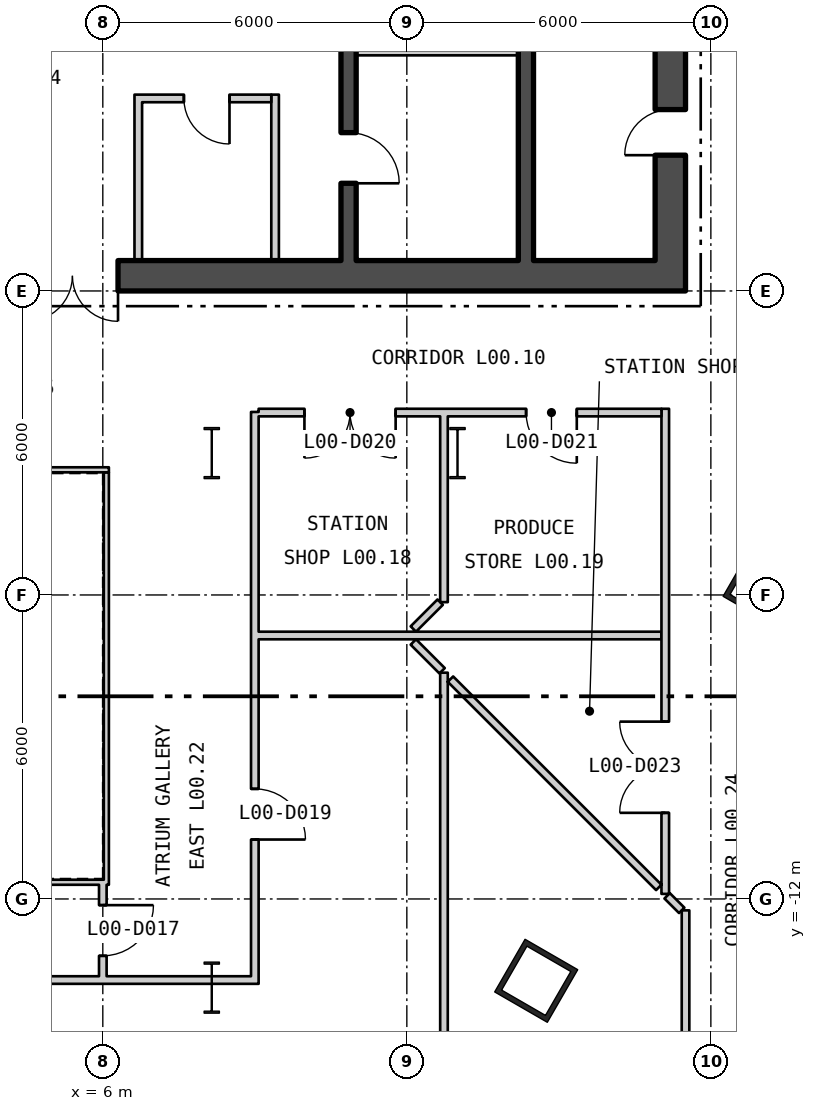
"""IFC4 building model, lengths in metres.
Left out: names, types, materials, properties, quantities, classifications, styles, units other than length and angle.
Written with IfcOpenShell. Run it as: python <this file> out.ifc"""

import sys

from ifc_helpers import new_model, si_unit, direction, frame, frame_2d, origin, origin_2d, place, context, subcontext, project, spatial, rectangle, hollow_rectangle, i_section, extrude, element, fill, save


model = new_model("IFC4")
c1 = context("Model", 3, precision=1e-05, world=origin(), true_north=direction((0.0, 1.0)))
c2 = subcontext(c1, "Body", "Model", "MODEL_VIEW")
j1 = project(units=[si_unit("LENGTHUNIT", "METRE"), si_unit("PLANEANGLEUNIT", "RADIAN")], contexts=[c1])
p1 = place(None, origin())
s1 = spatial("IfcSite", under=j1, at=p1, CompositionType="ELEMENT")
p2 = place(p1, origin())
s2 = spatial("IfcBuilding", under=s1, at=p2, CompositionType="ELEMENT")
p3 = place(p2, origin())
s3 = spatial("IfcBuildingStorey", under=s2, at=p3, CompositionType="ELEMENT", Elevation=0.0)
for number, where, z_axis, x_axis in (
    (1, (14.553, -13.615, 0.0), (0.0, 0.0, 1.0), (0.5, 0.866, 0.0)),
    (2, (19.061, -5.807, 0.0), (0.0, 0.0, 1.0), (0.5, 0.866, 0.0)),
):
    element("IfcColumn", number, at=place(p3, frame(where, z_axis=z_axis, x_axis=x_axis)), inside=s3, PredefinedType="COLUMN", context=c2, shape_type="SweptSolid", body=[
        extrude(hollow_rectangle(XDim=1.2, YDim=1.2, WallThickness=0.1, at=origin_2d()), origin(), (0.0, 0.0, 1.0), 8.4),
    ])
for number, where, z_axis, x_axis in (
    (3, (8.15, -3.2, 0.0), (0.0, 0.0, 1.0), (1.0, 0.0, 0.0)),
    (4, (8.15, -13.75, 0.0), (0.0, 0.0, 1.0), (1.0, 0.0, 0.0)),
    (5, (13.0, -3.2, 0.0), (0.0, 0.0, 1.0), (1.0, 0.0, 0.0)),
):
    element("IfcColumn", number, at=place(p3, frame(where, z_axis=z_axis, x_axis=x_axis)), inside=s3, PredefinedType="COLUMN", context=c2, shape_type="SweptSolid", body=[
        extrude(i_section(OverallWidth=0.302, OverallDepth=1.008, WebThickness=0.021, FlangeThickness=0.04, at=origin_2d()), origin(), (0.0, 0.0, 1.0), 8.4),
    ])
p4 = place(p3, frame((-6.12, -11.67, 0.0), z_axis=(0.0, 0.0, 1.0), x_axis=(1.0, 0.0, 0.0)))
e6 = element("IfcWall", 6, at=p4, inside=s3, PredefinedType="PARTITIONING", context=c2, shape_type="SweptSolid", body=[
    extrude(rectangle(XDim=12.24, YDim=0.1, at=frame_2d((6.12, 0.0))), origin(), (0.0, 0.0, 1.0), 8.18),
])
p5 = place(p3, frame((6.07, -11.62, 0.0), z_axis=(0.0, 0.0, 1.0), x_axis=(0.0, 1.0, 0.0)))
e7 = element("IfcWall", 7, at=p5, inside=s3, PredefinedType="PARTITIONING", context=c2, shape_type="SweptSolid", body=[
    extrude(rectangle(XDim=8.04, YDim=0.1, at=frame_2d((4.02, 0.0))), origin(), (0.0, 0.0, 1.0), 8.18),
])
p6 = place(p3, frame((6.12, -3.53, 0.0), z_axis=(0.0, 0.0, 1.0), x_axis=(-1.0, 0.0, 0.0)))
e8 = element("IfcWall", 8, at=p6, inside=s3, PredefinedType="PARTITIONING", context=c2, shape_type="SweptSolid", body=[
    extrude(rectangle(XDim=12.24, YDim=0.1, at=frame_2d((6.12, 0.0))), origin(), (0.0, 0.0, 1.0), 8.18),
])
p7 = place(p3, frame((-17.5, 0.3, 0.0), z_axis=(0.0, 0.0, 1.0), x_axis=(1.0, 0.0, 0.0)))
e9 = element("IfcWall", 9, at=p7, inside=s3, PredefinedType="SHEAR", context=c2, shape_type="SweptSolid", body=[
    extrude(rectangle(XDim=35.0, YDim=0.6, at=frame_2d((17.5, 0.0))), origin(), (0.0, 0.0, 1.0), 8.18),
])
p8 = place(p7, frame((12.0, 0.0, 0.0)))
e10 = element("IfcOpeningElement", 10, at=p8, cuts=e9, PredefinedType="OPENING", context=c2, shape_type="SweptSolid", body=[
    extrude(rectangle(XDim=1.8, YDim=2.4, at=frame_2d((0.9, 1.2))), frame((0.0, 0.31, 0.0), z_axis=(0.0, -1.0, 0.0), x_axis=(1.0, 0.0, 0.0)), (0.0, 0.0, 1.0), 0.62),
])
p9 = place(p7, frame((22.0, 0.0, 0.0)))
e11 = element("IfcOpeningElement", 11, at=p9, cuts=e9, PredefinedType="OPENING", context=c2, shape_type="SweptSolid", body=[
    extrude(rectangle(XDim=1.8, YDim=2.4, at=frame_2d((0.9, 1.2))), frame((0.0, 0.31, 0.0), z_axis=(0.0, -1.0, 0.0), x_axis=(1.0, 0.0, 0.0)), (0.0, 0.0, 1.0), 0.62),
])
p10 = place(p3, frame((17.2, 0.6, 0.0), z_axis=(0.0, 0.0, 1.0), x_axis=(0.0, 1.0, 0.0)))
e12 = element("IfcWall", 12, at=p10, inside=s3, PredefinedType="SHEAR", context=c2, shape_type="SweptSolid", body=[
    extrude(rectangle(XDim=16.8, YDim=0.6, at=frame_2d((8.4, 0.0))), origin(), (0.0, 0.0, 1.0), 8.18),
])
p11 = place(p10, frame((7.1, 0.0, 0.0)))
e13 = element("IfcOpeningElement", 13, at=p11, cuts=e12, PredefinedType="OPENING", context=c2, shape_type="SweptSolid", body=[
    extrude(rectangle(XDim=1.5, YDim=2.4, at=frame_2d((0.75, 1.2))), frame((0.0, 0.31, 0.0), z_axis=(0.0, -1.0, 0.0), x_axis=(1.0, 0.0, 0.0)), (0.0, 0.0, 1.0), 0.62),
])
p12 = place(p10, frame((9.525, 0.0, 0.0)))
e14 = element("IfcOpeningElement", 14, at=p12, cuts=e12, PredefinedType="OPENING", context=c2, shape_type="SweptSolid", body=[
    extrude(rectangle(XDim=1.5, YDim=2.4, at=frame_2d((0.75, 1.2))), frame((0.0, 0.31, 0.0), z_axis=(0.0, -1.0, 0.0), x_axis=(1.0, 0.0, 0.0)), (0.0, 0.0, 1.0), 0.62),
])
p13 = place(p10, frame((2.08, 0.0, 0.0)))
e15 = element("IfcOpeningElement", 15, at=p13, cuts=e12, PredefinedType="OPENING", context=c2, shape_type="SweptSolid", body=[
    extrude(rectangle(XDim=0.9, YDim=2.1, at=frame_2d((0.45, 1.05))), frame((0.0, 0.31, 0.0), z_axis=(0.0, -1.0, 0.0), x_axis=(1.0, 0.0, 0.0)), (0.0, 0.0, 1.0), 0.62),
])
p14 = place(p10, frame((5.63, 0.0, 0.0)))
e16 = element("IfcOpeningElement", 16, at=p14, cuts=e12, PredefinedType="OPENING", context=c2, shape_type="SweptSolid", body=[
    extrude(rectangle(XDim=0.9, YDim=2.1, at=frame_2d((0.45, 1.05))), frame((0.0, 0.31, 0.0), z_axis=(0.0, -1.0, 0.0), x_axis=(1.0, 0.0, 0.0)), (0.0, 0.0, 1.0), 0.62),
])
p15 = place(p10, frame((13.175, 0.0, 0.0)))
e17 = element("IfcOpeningElement", 17, at=p15, cuts=e12, PredefinedType="OPENING", context=c2, shape_type="SweptSolid", body=[
    extrude(rectangle(XDim=1.0, YDim=2.1, at=frame_2d((0.5, 1.05))), frame((0.0, 0.31, 0.0), z_axis=(0.0, -1.0, 0.0), x_axis=(1.0, 0.0, 0.0)), (0.0, 0.0, 1.0), 0.62),
])
p16 = place(p10, frame((15.238, 0.0, 0.0)))
e18 = element("IfcOpeningElement", 18, at=p16, cuts=e12, PredefinedType="OPENING", context=c2, shape_type="SweptSolid", body=[
    extrude(rectangle(XDim=0.9, YDim=2.1, at=frame_2d((0.45, 1.05))), frame((0.0, 0.31, 0.0), z_axis=(0.0, -1.0, 0.0), x_axis=(1.0, 0.0, 0.0)), (0.0, 0.0, 1.0), 0.62),
])
p17 = place(p3, frame((10.85, 0.6, 0.0), z_axis=(0.0, 0.0, 1.0), x_axis=(0.0, 1.0, 0.0)))
e19 = element("IfcWall", 19, at=p17, inside=s3, PredefinedType="SHEAR", context=c2, shape_type="SweptSolid", body=[
    extrude(rectangle(XDim=16.8, YDim=0.3, at=frame_2d((8.4, 0.0))), origin(), (0.0, 0.0, 1.0), 8.18),
])
p18 = place(p17, frame((1.525, 0.0, 0.0)))
e20 = element("IfcOpeningElement", 20, at=p18, cuts=e19, PredefinedType="OPENING", context=c2, shape_type="SweptSolid", body=[
    extrude(rectangle(XDim=1.0, YDim=2.1, at=frame_2d((0.5, 1.05))), frame((0.0, 0.16, 0.0), z_axis=(0.0, -1.0, 0.0), x_axis=(1.0, 0.0, 0.0)), (0.0, 0.0, 1.0), 0.32),
])
p19 = place(p3, frame((14.35, 0.6, 0.0), z_axis=(0.0, 0.0, 1.0), x_axis=(0.0, 1.0, 0.0)))
e21 = element("IfcWall", 21, at=p19, inside=s3, PredefinedType="SHEAR", context=c2, shape_type="SweptSolid", body=[
    extrude(rectangle(XDim=16.8, YDim=0.3, at=frame_2d((8.4, 0.0))), origin(), (0.0, 0.0, 1.0), 8.18),
])
p20 = place(p19, frame((9.25, 0.0, 0.0)))
e22 = element("IfcOpeningElement", 22, at=p20, cuts=e21, PredefinedType="OPENING", context=c2, shape_type="SweptSolid", body=[
    extrude(rectangle(XDim=1.0, YDim=2.1, at=frame_2d((0.5, 1.05))), frame((0.0, 0.16, 0.0), z_axis=(0.0, -1.0, 0.0), x_axis=(1.0, 0.0, 0.0)), (0.0, 0.0, 1.0), 0.32),
])
p21 = place(p19, frame((7.1, 0.0, 0.0)))
e23 = element("IfcOpeningElement", 23, at=p21, cuts=e21, PredefinedType="OPENING", context=c2, shape_type="SweptSolid", body=[
    extrude(rectangle(XDim=1.5, YDim=2.4, at=frame_2d((0.75, 1.2))), frame((0.0, 0.16, 0.0), z_axis=(0.0, -1.0, 0.0), x_axis=(1.0, 0.0, 0.0)), (0.0, 0.0, 1.0), 0.32),
])
p22 = place(p3, frame((11.0, 4.725, 0.0), z_axis=(0.0, 0.0, 1.0), x_axis=(1.0, 0.0, 0.0)))
e24 = element("IfcWall", 24, at=p22, inside=s3, PredefinedType="PARTITIONING", context=c2, shape_type="SweptSolid", body=[
    extrude(rectangle(XDim=3.2, YDim=0.15, at=frame_2d((1.6, 0.0))), origin(), (0.0, 0.0, 1.0), 8.18),
])
for number, where, z_axis, x_axis in (
    (25, (6.7, 0.6, 0.0), (0.0, 0.0, 1.0), (0.0, 1.0, 0.0)),
    (26, (9.4, 0.6, 0.0), (0.0, 0.0, 1.0), (0.0, 1.0, 0.0)),
):
    element("IfcWall", number, at=place(p3, frame(where, z_axis=z_axis, x_axis=x_axis)), inside=s3, PredefinedType="PARTITIONING", context=c2, shape_type="SweptSolid", body=[
        extrude(rectangle(XDim=3.275, YDim=0.15, at=frame_2d((1.637, 0.0))), origin(), (0.0, 0.0, 1.0), 8.18),
    ])
p23 = place(p3, frame((6.775, 3.8, 0.0), z_axis=(0.0, 0.0, 1.0), x_axis=(1.0, 0.0, 0.0)))
e27 = element("IfcWall", 27, at=p23, inside=s3, PredefinedType="PARTITIONING", context=c2, shape_type="SweptSolid", body=[
    extrude(rectangle(XDim=2.55, YDim=0.15, at=frame_2d((1.275, 0.0))), origin(), (0.0, 0.0, 1.0), 8.18),
])
p24 = place(p23, frame((0.825, 0.0, 0.0)))
e28 = element("IfcOpeningElement", 28, at=p24, cuts=e27, PredefinedType="OPENING", context=c2, shape_type="SweptSolid", body=[
    extrude(rectangle(XDim=0.9, YDim=2.1, at=frame_2d((0.45, 1.05))), frame((0.0, 0.085, 0.0), z_axis=(0.0, -1.0, 0.0), x_axis=(1.0, 0.0, 0.0)), (0.0, 0.0, 1.0), 0.17),
])
p25 = place(p3, frame((4.3, -13.6, 0.0), z_axis=(0.0, 0.0, 1.0), x_axis=(1.0, 0.0, 0.0)))
e29 = element("IfcWall", 29, at=p25, inside=s3, PredefinedType="PARTITIONING", context=c2, shape_type="SweptSolid", body=[
    extrude(rectangle(XDim=3.85, YDim=0.15, at=frame_2d((1.925, 0.0))), origin(), (0.0, 0.0, 1.0), 7.27),
])
p26 = place(p3, frame((8.15, -13.6, 0.0), z_axis=(0.0, 0.0, 1.0), x_axis=(1.0, 0.0, 0.0)))
e30 = element("IfcWall", 30, at=p26, inside=s3, PredefinedType="PARTITIONING", context=c2, shape_type="SweptSolid", body=[
    extrude(rectangle(XDim=0.775, YDim=0.15, at=frame_2d((0.388, 0.0))), origin(), (0.0, 0.0, 1.0), 7.39),
])
p27 = place(p3, frame((6.0, -13.525, 0.0), z_axis=(0.0, 0.0, 1.0), x_axis=(0.0, 1.0, 0.0)))
e31 = element("IfcWall", 31, at=p27, inside=s3, PredefinedType="PARTITIONING", context=c2, shape_type="SweptSolid", body=[
    extrude(rectangle(XDim=1.805, YDim=0.15, at=frame_2d((0.902, 0.0))), origin(), (0.0, 0.0, 1.0), 8.18),
])
p28 = place(p27, frame((0.403, 0.0, 0.0)))
e32 = element("IfcOpeningElement", 32, at=p28, cuts=e31, PredefinedType="OPENING", context=c2, shape_type="SweptSolid", body=[
    extrude(rectangle(XDim=1.0, YDim=2.1, at=frame_2d((0.5, 1.05))), frame((0.0, 0.085, 0.0), z_axis=(0.0, -1.0, 0.0), x_axis=(1.0, 0.0, 0.0)), (0.0, 0.0, 1.0), 0.17),
])
p29 = place(p3, frame((9.0, -13.675, 0.0), z_axis=(0.0, 0.0, 1.0), x_axis=(0.0, 1.0, 0.0)))
e33 = element("IfcWall", 33, at=p29, inside=s3, PredefinedType="PARTITIONING", context=c2, shape_type="SweptSolid", body=[
    extrude(rectangle(XDim=11.287, YDim=0.15, at=frame_2d((5.644, 0.0))), origin(), (0.0, 0.0, 1.0), 8.18),
])
p30 = place(p29, frame((2.848, 0.0, 0.0)))
e34 = element("IfcOpeningElement", 34, at=p30, cuts=e33, PredefinedType="OPENING", context=c2, shape_type="SweptSolid", body=[
    extrude(rectangle(XDim=1.0, YDim=2.1, at=frame_2d((0.5, 1.05))), frame((0.0, 0.085, 0.0), z_axis=(0.0, -1.0, 0.0), x_axis=(1.0, 0.0, 0.0)), (0.0, 0.0, 1.0), 0.17),
])
p31 = place(p3, frame((9.075, -6.8, 0.0), z_axis=(0.0, 0.0, 1.0), x_axis=(1.0, 0.0, 0.0)))
e35 = element("IfcWall", 35, at=p31, inside=s3, PredefinedType="PARTITIONING", context=c2, shape_type="SweptSolid", body=[
    extrude(rectangle(XDim=7.95, YDim=0.15, at=frame_2d((3.975, 0.0))), origin(), (0.0, 0.0, 1.0), 8.18),
])
p32 = place(p3, frame((9.075, -2.4, 0.0), z_axis=(0.0, 0.0, 1.0), x_axis=(1.0, 0.0, 0.0)))
e36 = element("IfcWall", 36, at=p32, inside=s3, PredefinedType="PARTITIONING", context=c2, shape_type="SweptSolid", body=[
    extrude(rectangle(XDim=7.95, YDim=0.15, at=frame_2d((3.975, 0.0))), origin(), (0.0, 0.0, 1.0), 8.18),
])
p33 = place(p32, frame((0.904, 0.0, 0.0)))
e37 = element("IfcOpeningElement", 37, at=p33, cuts=e36, PredefinedType="OPENING", context=c2, shape_type="SweptSolid", body=[
    extrude(rectangle(XDim=1.8, YDim=2.1, at=frame_2d((0.9, 1.05))), frame((0.0, 0.085, 0.0), z_axis=(0.0, -1.0, 0.0), x_axis=(1.0, 0.0, 0.0)), (0.0, 0.0, 1.0), 0.17),
])
p34 = place(p32, frame((5.279, 0.0, 0.0)))
e38 = element("IfcOpeningElement", 38, at=p34, cuts=e36, PredefinedType="OPENING", context=c2, shape_type="SweptSolid", body=[
    extrude(rectangle(XDim=1.0, YDim=2.1, at=frame_2d((0.5, 1.05))), frame((0.0, 0.085, 0.0), z_axis=(0.0, -1.0, 0.0), x_axis=(1.0, 0.0, 0.0)), (0.0, 0.0, 1.0), 0.17),
])
p35 = place(p3, frame((12.128, -6.928, 0.0), z_axis=(0.0, 0.0, 1.0), x_axis=(0.707106781187, -0.707106781187, 0.0)))
e39 = element("IfcWall", 39, at=p35, inside=s3, PredefinedType="PARTITIONING", context=c2, shape_type="SweptSolid", body=[
    extrude(rectangle(XDim=0.803, YDim=0.15, at=frame_2d((0.402, 0.0))), origin(), (0.0, 0.0, 1.0), 8.18),
])
p36 = place(p3, frame((12.128, -6.672, 0.0), z_axis=(0.0, 0.0, 1.0), x_axis=(0.707106781187, 0.707106781187, 0.0)))
e40 = element("IfcWall", 40, at=p36, inside=s3, PredefinedType="PARTITIONING", context=c2, shape_type="SweptSolid", body=[
    extrude(rectangle(XDim=0.75, YDim=0.15, at=frame_2d((0.375, 0.0))), origin(), (0.0, 0.0, 1.0), 8.18),
])
p37 = place(p3, frame((12.733, -16.567, 0.0), z_axis=(0.0, 0.0, 1.0), x_axis=(0.0, 1.0, 0.0)))
e41 = element("IfcWall", 41, at=p37, inside=s3, PredefinedType="PARTITIONING", context=c2, shape_type="SweptSolid", body=[
    extrude(rectangle(XDim=2.717, YDim=0.15, at=frame_2d((1.359, 0.0))), origin(), (0.0, 0.0, 1.0), 7.58),
])
p38 = place(p3, frame((12.733, -13.85, 0.0), z_axis=(0.0, 0.0, 1.0), x_axis=(0.0, 1.0, 0.0)))
e42 = element("IfcWall", 42, at=p38, inside=s3, PredefinedType="PARTITIONING", context=c2, shape_type="SweptSolid", body=[
    extrude(rectangle(XDim=6.316, YDim=0.15, at=frame_2d((3.158, 0.0))), origin(), (0.0, 0.0, 1.0), 7.49),
])
p39 = place(p3, frame((12.733, -6.142, 0.0), z_axis=(0.0, 0.0, 1.0), x_axis=(0.0, 1.0, 0.0)))
e43 = element("IfcWall", 43, at=p39, inside=s3, PredefinedType="PARTITIONING", context=c2, shape_type="SweptSolid", body=[
    extrude(rectangle(XDim=3.042, YDim=0.15, at=frame_2d((1.521, 0.0))), origin(), (0.0, 0.0, 1.0), 7.49),
])
p40 = place(p3, frame((12.733, -3.1, 0.0), z_axis=(0.0, 0.0, 1.0), x_axis=(0.0, 1.0, 0.0)))
e44 = element("IfcWall", 44, at=p40, inside=s3, PredefinedType="PARTITIONING", context=c2, shape_type="SweptSolid", body=[
    extrude(rectangle(XDim=0.625, YDim=0.15, at=frame_2d((0.312, 0.0))), origin(), (0.0, 0.0, 1.0), 7.58),
])
p41 = place(p3, frame((12.861, -7.661, 0.0), z_axis=(0.0, 0.0, 1.0), x_axis=(0.707106781187, -0.707106781187, 0.0)))
e45 = element("IfcWall", 45, at=p41, inside=s3, PredefinedType="PARTITIONING", context=c2, shape_type="SweptSolid", body=[
    extrude(rectangle(XDim=5.814, YDim=0.15, at=frame_2d((2.907, 0.0))), origin(), (0.0, 0.0, 1.0), 8.18),
])
p42 = place(p3, frame((17.1, -11.9, 0.0), z_axis=(0.0, 0.0, 1.0), x_axis=(0.0, 1.0, 0.0)))
e46 = element("IfcWall", 46, at=p42, inside=s3, PredefinedType="PARTITIONING", context=c2, shape_type="SweptSolid", body=[
    extrude(rectangle(XDim=9.575, YDim=0.15, at=frame_2d((4.787, 0.0))), origin(), (0.0, 0.0, 1.0), 8.18),
])
p43 = place(p42, frame((1.6, 0.0, 0.0)))
e47 = element("IfcOpeningElement", 47, at=p43, cuts=e46, PredefinedType="OPENING", context=c2, shape_type="SweptSolid", body=[
    extrude(rectangle(XDim=1.8, YDim=2.1, at=frame_2d((0.9, 1.05))), frame((0.0, 0.085, 0.0), z_axis=(0.0, -1.0, 0.0), x_axis=(1.0, 0.0, 0.0)), (0.0, 0.0, 1.0), 0.17),
])
p44 = place(p3, frame((17.137, -11.938, 0.0), z_axis=(0.0, 0.0, 1.0), x_axis=(0.708335460904, -0.705875962776, 0.0)))
e48 = element("IfcWall", 48, at=p44, inside=s3, PredefinedType="PARTITIONING", context=c2, shape_type="SweptSolid", body=[
    extrude(rectangle(XDim=0.407, YDim=0.15, at=frame_2d((0.203, 0.0))), origin(), (0.0, 0.0, 1.0), 8.18),
])
p45 = place(p3, frame((17.5, -21.375, 0.0), z_axis=(0.0, 0.0, 1.0), x_axis=(0.0, 1.0, 0.0)))
e49 = element("IfcWall", 49, at=p45, inside=s3, PredefinedType="PARTITIONING", context=c2, shape_type="SweptSolid", body=[
    extrude(rectangle(XDim=9.15, YDim=0.15, at=frame_2d((4.575, 0.0))), origin(), (0.0, 0.0, 1.0), 8.18),
])
p46 = place(p18, origin())
e50 = element("IfcDoor", 50, at=p46, inside=s3, OperationType="SINGLE_SWING_LEFT", PredefinedType="DOOR", context=c2, shape_type="SweptSolid", body=[
    extrude(rectangle(XDim=1.0, YDim=2.1, at=frame_2d((0.5, 1.05))), frame((0.0, 0.025, 0.0), z_axis=(0.0, -1.0, 0.0), x_axis=(1.0, 0.0, 0.0)), (0.0, 0.0, 1.0), 0.05),
])
fill(e20, e50)
p47 = place(p13, origin())
e51 = element("IfcDoor", 51, at=p47, inside=s3, OperationType="SINGLE_SWING_RIGHT", PredefinedType="DOOR", context=c2, shape_type="SweptSolid", body=[
    extrude(rectangle(XDim=0.9, YDim=2.1, at=frame_2d((0.45, 1.05))), frame((0.0, 0.025, 0.0), z_axis=(0.0, -1.0, 0.0), x_axis=(1.0, 0.0, 0.0)), (0.0, 0.0, 1.0), 0.05),
])
fill(e15, e51)
p48 = place(p24, origin())
e52 = element("IfcDoor", 52, at=p48, inside=s3, OperationType="SINGLE_SWING_RIGHT", PredefinedType="DOOR", context=c2, shape_type="SweptSolid", body=[
    extrude(rectangle(XDim=0.9, YDim=2.1, at=frame_2d((0.45, 1.05))), frame((0.0, 0.025, 0.0), z_axis=(0.0, -1.0, 0.0), x_axis=(1.0, 0.0, 0.0)), (0.0, 0.0, 1.0), 0.05),
])
fill(e28, e52)
p49 = place(p9, origin())
e53 = element("IfcDoor", 53, at=p49, inside=s3, OperationType="DOUBLE_DOOR_SINGLE_SWING", PredefinedType="DOOR", context=c2, shape_type="SweptSolid", body=[
    extrude(rectangle(XDim=1.8, YDim=2.4, at=frame_2d((0.9, 1.2))), frame((0.0, 0.025, 0.0), z_axis=(0.0, -1.0, 0.0), x_axis=(1.0, 0.0, 0.0)), (0.0, 0.0, 1.0), 0.05),
])
fill(e11, e53)
p50 = place(p28, origin())
e54 = element("IfcDoor", 54, at=p50, inside=s3, OperationType="SINGLE_SWING_RIGHT", PredefinedType="DOOR", context=c2, shape_type="SweptSolid", body=[
    extrude(rectangle(XDim=1.0, YDim=2.1, at=frame_2d((0.5, 1.05))), frame((0.0, 0.025, 0.0), z_axis=(0.0, -1.0, 0.0), x_axis=(1.0, 0.0, 0.0)), (0.0, 0.0, 1.0), 0.05),
])
fill(e32, e54)
p51 = place(p30, origin())
e55 = element("IfcDoor", 55, at=p51, inside=s3, OperationType="SINGLE_SWING_LEFT", PredefinedType="DOOR", context=c2, shape_type="SweptSolid", body=[
    extrude(rectangle(XDim=1.0, YDim=2.1, at=frame_2d((0.5, 1.05))), frame((0.0, 0.025, 0.0), z_axis=(0.0, -1.0, 0.0), x_axis=(1.0, 0.0, 0.0)), (0.0, 0.0, 1.0), 0.05),
])
fill(e34, e55)
p52 = place(p33, origin())
e56 = element("IfcDoor", 56, at=p52, inside=s3, OperationType="DOUBLE_DOOR_SINGLE_SWING", PredefinedType="DOOR", context=c2, shape_type="SweptSolid", body=[
    extrude(rectangle(XDim=1.8, YDim=2.1, at=frame_2d((0.9, 1.05))), frame((0.0, 0.025, 0.0), z_axis=(0.0, -1.0, 0.0), x_axis=(1.0, 0.0, 0.0)), (0.0, 0.0, 1.0), 0.05),
])
fill(e37, e56)
p53 = place(p34, origin())
e57 = element("IfcDoor", 57, at=p53, inside=s3, OperationType="SINGLE_SWING_RIGHT", PredefinedType="DOOR", context=c2, shape_type="SweptSolid", body=[
    extrude(rectangle(XDim=1.0, YDim=2.1, at=frame_2d((0.5, 1.05))), frame((0.0, 0.025, 0.0), z_axis=(0.0, -1.0, 0.0), x_axis=(1.0, 0.0, 0.0)), (0.0, 0.0, 1.0), 0.05),
])
fill(e38, e57)
p54 = place(p43, origin())
e58 = element("IfcDoor", 58, at=p54, inside=s3, OperationType="DOUBLE_DOOR_SINGLE_SWING", PredefinedType="DOOR", context=c2, shape_type="SweptSolid", body=[
    extrude(rectangle(XDim=1.8, YDim=2.1, at=frame_2d((0.9, 1.05))), frame((0.0, 0.025, 0.0), z_axis=(0.0, -1.0, 0.0), x_axis=(1.0, 0.0, 0.0)), (0.0, 0.0, 1.0), 0.05),
])
fill(e47, e58)
save(model, sys.argv[1])
